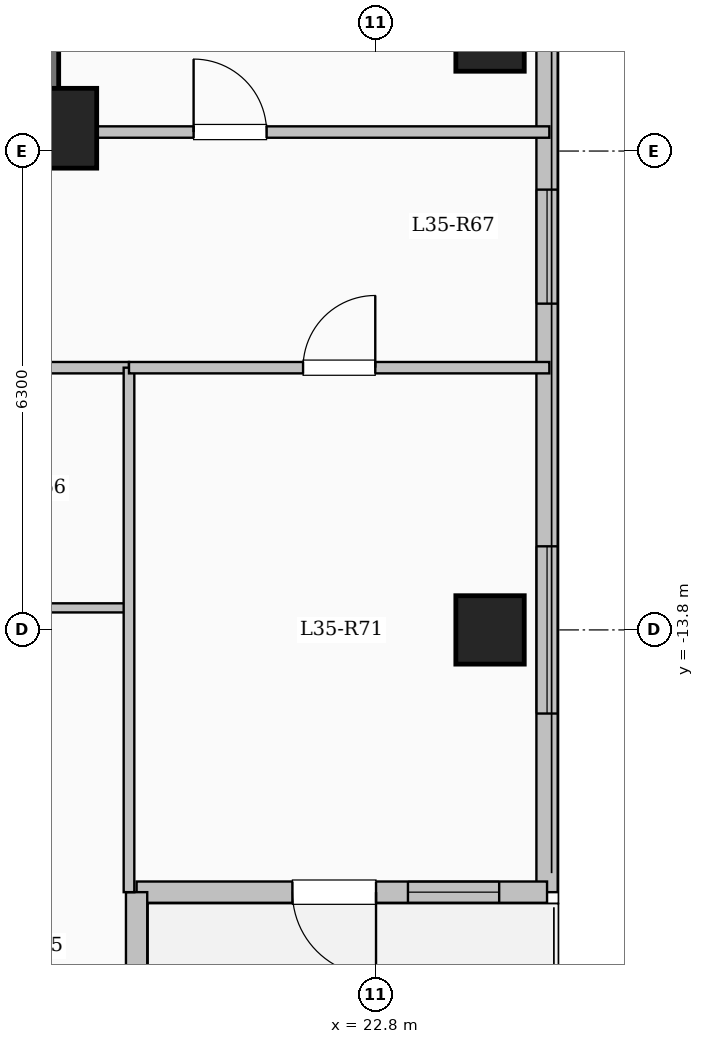
"""IFC4 building model, lengths in metres.
Left out: names, types, materials, properties, quantities, classifications, styles, units other than length and angle.
Written with IfcOpenShell. Run it as: python <this file> out.ifc"""

import sys

from ifc_helpers import new_model, si_unit, direction, frame, frame_2d, origin, origin_2d, place, context, subcontext, project, spatial, rectangle, extrude, element, fill, save


model = new_model("IFC4")
c1 = context("Model", 3, precision=1e-05, world=origin(), true_north=direction((0.0, 1.0)))
c2 = subcontext(c1, "Body", "Model", "MODEL_VIEW")
j1 = project(units=[si_unit("LENGTHUNIT", "METRE"), si_unit("PLANEANGLEUNIT", "RADIAN")], contexts=[c1])
p1 = place(None, origin())
s1 = spatial("IfcSite", under=j1, at=p1, CompositionType="ELEMENT")
p2 = place(p1, origin())
s2 = spatial("IfcBuilding", under=s1, at=p2, CompositionType="ELEMENT")
p3 = place(p2, frame((0.0, 0.0, 132.6)))
s3 = spatial("IfcBuildingStorey", under=s2, at=p3, CompositionType="ELEMENT", Elevation=132.6)
p4 = place(p3, frame((18.6, -7.2, 0.0), z_axis=(0.0, 0.0, 1.0), x_axis=(1.0, 0.0, 0.0)))
e1 = element("IfcColumn", 1, at=p4, inside=s3, PredefinedType="COLUMN", context=c2, shape_type="SweptSolid", body=[
    extrude(rectangle(XDim=1.05, YDim=1.05, at=origin_2d()), origin(), (0.0, 0.0, 1.0), 3.35),
])
for number, where, z_axis, x_axis in (
    (2, (24.3, -13.8, 0.0), (0.0, 0.0, 1.0), (1.0, 0.0, 0.0)),
    (3, (24.3, -6.0, 0.0), (0.0, 0.0, 1.0), (1.0, 0.0, 0.0)),
):
    element("IfcColumn", number, at=place(p3, frame(where, z_axis=z_axis, x_axis=x_axis)), inside=s3, PredefinedType="COLUMN", context=c2, shape_type="SweptSolid", body=[
        extrude(rectangle(XDim=0.9, YDim=0.9, at=origin_2d()), origin(), (0.0, 0.0, 1.0), 3.35),
    ])
p5 = place(p3, frame((25.05, 17.25, 0.0), z_axis=(0.0, 0.0, 1.0), x_axis=(0.0, -1.0, 0.0)))
e4 = element("IfcWall", 4, at=p5, inside=s3, PredefinedType="SOLIDWALL", context=c2, shape_type="SweptSolid", body=[
    extrude(rectangle(XDim=34.5, YDim=0.28, at=frame_2d((17.25, 0.0))), origin(), (0.0, 0.0, 1.0), 3.1),
])
p6 = place(p5, frame((1.375, 0.0, 0.9)))
e5 = element("IfcOpeningElement", 5, at=p6, cuts=e4, PredefinedType="OPENING", context=c2, shape_type="SweptSolid", body=[
    extrude(rectangle(XDim=2.0, YDim=1.7, at=frame_2d((1.0, 0.85))), frame((0.0, 0.15, 0.0), z_axis=(0.0, -1.0, 0.0), x_axis=(1.0, 0.0, 0.0)), (0.0, 0.0, 1.0), 0.3),
])
p7 = place(p5, frame((5.125, 0.0, 0.95)))
e6 = element("IfcOpeningElement", 6, at=p7, cuts=e4, PredefinedType="OPENING", context=c2, shape_type="SweptSolid", body=[
    extrude(rectangle(XDim=1.0, YDim=1.5, at=frame_2d((0.5, 0.75))), frame((0.0, 0.15, 0.0), z_axis=(0.0, -1.0, 0.0), x_axis=(1.0, 0.0, 0.0)), (0.0, 0.0, 1.0), 0.3),
])
p8 = place(p5, frame((8.375, 0.0, 0.9)))
e7 = element("IfcOpeningElement", 7, at=p8, cuts=e4, PredefinedType="OPENING", context=c2, shape_type="SweptSolid", body=[
    extrude(rectangle(XDim=2.0, YDim=1.7, at=frame_2d((1.0, 0.85))), frame((0.0, 0.15, 0.0), z_axis=(0.0, -1.0, 0.0), x_axis=(1.0, 0.0, 0.0)), (0.0, 0.0, 1.0), 0.3),
])
p9 = place(p5, frame((13.2, 0.0, 0.9)))
e8 = element("IfcOpeningElement", 8, at=p9, cuts=e4, PredefinedType="OPENING", context=c2, shape_type="SweptSolid", body=[
    extrude(rectangle(XDim=1.65, YDim=1.6, at=frame_2d((0.825, 0.8))), frame((0.0, 0.15, 0.0), z_axis=(0.0, -1.0, 0.0), x_axis=(1.0, 0.0, 0.0)), (0.0, 0.0, 1.0), 0.3),
])
p10 = place(p5, frame((19.05, 0.0, 0.9)))
e9 = element("IfcOpeningElement", 9, at=p10, cuts=e4, PredefinedType="OPENING", context=c2, shape_type="SweptSolid", body=[
    extrude(rectangle(XDim=2.2, YDim=1.75, at=frame_2d((1.1, 0.875))), frame((0.0, 0.15, 0.0), z_axis=(0.0, -1.0, 0.0), x_axis=(1.0, 0.0, 0.0)), (0.0, 0.0, 1.0), 0.3),
])
p11 = place(p5, frame((25.258, 0.0, 0.9)))
e10 = element("IfcOpeningElement", 10, at=p11, cuts=e4, PredefinedType="OPENING", context=c2, shape_type="SweptSolid", body=[
    extrude(rectangle(XDim=1.5, YDim=1.65, at=frame_2d((0.75, 0.825))), frame((0.0, 0.15, 0.0), z_axis=(0.0, -1.0, 0.0), x_axis=(1.0, 0.0, 0.0)), (0.0, 0.0, 1.0), 0.3),
])
p12 = place(p5, frame((29.95, 0.0, 0.9)))
e11 = element("IfcOpeningElement", 11, at=p12, cuts=e4, PredefinedType="OPENING", context=c2, shape_type="SweptSolid", body=[
    extrude(rectangle(XDim=2.2, YDim=1.75, at=frame_2d((1.1, 0.875))), frame((0.0, 0.15, 0.0), z_axis=(0.0, -1.0, 0.0), x_axis=(1.0, 0.0, 0.0)), (0.0, 0.0, 1.0), 0.3),
])
p13 = place(p3, frame((25.05, -17.25, 0.0), z_axis=(0.0, 0.0, 1.0), x_axis=(-1.0, 0.0, 0.0)))
e12 = element("IfcWall", 12, at=p13, inside=s3, PredefinedType="SOLIDWALL", context=c2, shape_type="SweptSolid", body=[
    extrude(rectangle(XDim=5.4, YDim=0.28, at=frame_2d((2.7, 0.0))), origin(), (0.0, 0.0, 1.0), 3.1),
])
p14 = place(p13, frame((2.25, 0.0, 0.0)))
e13 = element("IfcOpeningElement", 13, at=p14, cuts=e12, PredefinedType="OPENING", context=c2, shape_type="SweptSolid", body=[
    extrude(rectangle(XDim=1.1, YDim=2.2, at=frame_2d((0.55, 1.1))), frame((0.0, 0.15, 0.0), z_axis=(0.0, -1.0, 0.0), x_axis=(1.0, 0.0, 0.0)), (0.0, 0.0, 1.0), 0.3),
])
p15 = place(p13, frame((0.63, 0.0, 0.95)))
e14 = element("IfcOpeningElement", 14, at=p15, cuts=e12, PredefinedType="OPENING", context=c2, shape_type="SweptSolid", body=[
    extrude(rectangle(XDim=1.2, YDim=1.5, at=frame_2d((0.6, 0.75))), frame((0.0, 0.15, 0.0), z_axis=(0.0, -1.0, 0.0), x_axis=(1.0, 0.0, 0.0)), (0.0, 0.0, 1.0), 0.3),
])
p16 = place(p3, frame((19.65, -17.25, 0.0), z_axis=(0.0, 0.0, 1.0), x_axis=(0.0, -1.0, 0.0)))
e15 = element("IfcWall", 15, at=p16, inside=s3, PredefinedType="SOLIDWALL", context=c2, shape_type="SweptSolid", body=[
    extrude(rectangle(XDim=3.9, YDim=0.28, at=frame_2d((1.95, 0.0))), origin(), (0.0, 0.0, 1.0), 3.1),
])
p17 = place(p16, frame((1.107, 0.0, 0.9)))
e16 = element("IfcOpeningElement", 16, at=p17, cuts=e15, PredefinedType="OPENING", context=c2, shape_type="SweptSolid", body=[
    extrude(rectangle(XDim=1.65, YDim=1.6, at=frame_2d((0.825, 0.8))), frame((0.0, 0.15, 0.0), z_axis=(0.0, -1.0, 0.0), x_axis=(1.0, 0.0, 0.0)), (0.0, 0.0, 1.0), 0.3),
])
p18 = place(p3, frame((18.45, -7.375, 0.0), z_axis=(0.0, 0.0, 1.0), x_axis=(0.0, 1.0, 0.0)))
e17 = element("IfcWall", 17, at=p18, inside=s3, PredefinedType="SHEAR", context=c2, shape_type="SweptSolid", body=[
    extrude(rectangle(XDim=14.05, YDim=0.35, at=frame_2d((7.025, 0.0))), origin(), (0.0, 0.0, 1.0), 3.35),
])
p19 = place(p3, frame((10.075, -7.2, 0.0), z_axis=(0.0, 0.0, 1.0), x_axis=(1.0, 0.0, 0.0)))
e18 = element("IfcWall", 18, at=p19, inside=s3, PredefinedType="SHEAR", context=c2, shape_type="SweptSolid", body=[
    extrude(rectangle(XDim=8.55, YDim=0.35, at=frame_2d((4.275, 0.0))), origin(), (0.0, 0.0, 1.0), 3.35),
])
p20 = place(p3, frame((8.55, -10.35, 0.0), z_axis=(0.0, 0.0, 1.0), x_axis=(1.0, 0.0, 0.0)))
e19 = element("IfcWall", 19, at=p20, inside=s3, PredefinedType="PARTITIONING", context=c2, shape_type="SweptSolid", body=[
    extrude(rectangle(XDim=11.0, YDim=0.15, at=frame_2d((5.5, 0.0))), origin(), (0.0, 0.0, 1.0), 3.1),
])
p21 = place(p20, frame((0.75, 0.0, 0.0)))
e20 = element("IfcOpeningElement", 20, at=p21, cuts=e19, PredefinedType="OPENING", context=c2, shape_type="SweptSolid", body=[
    extrude(rectangle(XDim=0.96, YDim=2.15, at=frame_2d((0.48, 1.075))), frame((0.0, 0.085, 0.0), z_axis=(0.0, -1.0, 0.0), x_axis=(1.0, 0.0, 0.0)), (0.0, 0.0, 1.0), 0.17),
])
p22 = place(p20, frame((5.787, 0.0, 0.0)))
e21 = element("IfcOpeningElement", 21, at=p22, cuts=e19, PredefinedType="OPENING", context=c2, shape_type="SweptSolid", body=[
    extrude(rectangle(XDim=0.96, YDim=2.15, at=frame_2d((0.48, 1.075))), frame((0.0, 0.085, 0.0), z_axis=(0.0, -1.0, 0.0), x_axis=(1.0, 0.0, 0.0)), (0.0, 0.0, 1.0), 0.17),
])
p23 = place(p3, frame((16.649, -13.51, 0.0), z_axis=(0.0, 0.0, 1.0), x_axis=(1.0, 0.0, 0.0)))
e22 = element("IfcWall", 22, at=p23, inside=s3, PredefinedType="PARTITIONING", context=c2, shape_type="SweptSolid", body=[
    extrude(rectangle(XDim=2.961, YDim=0.12, at=frame_2d((1.48, 0.0))), origin(), (0.0, 0.0, 1.0), 3.1),
])
p24 = place(p3, frame((18.45, -7.25, 0.0), z_axis=(0.0, 0.0, 1.0), x_axis=(1.0, 0.0, 0.0)))
e23 = element("IfcWall", 23, at=p24, inside=s3, PredefinedType="PARTITIONING", context=c2, shape_type="SweptSolid", body=[
    extrude(rectangle(XDim=6.63, YDim=0.15, at=frame_2d((3.315, 0.0))), origin(), (0.0, 0.0, 1.0), 3.1),
])
p25 = place(p24, frame((1.95, 0.0, 0.0)))
e24 = element("IfcOpeningElement", 24, at=p25, cuts=e23, PredefinedType="OPENING", context=c2, shape_type="SweptSolid", body=[
    extrude(rectangle(XDim=0.96, YDim=2.15, at=frame_2d((0.48, 1.075))), frame((0.0, 0.085, 0.0), z_axis=(0.0, -1.0, 0.0), x_axis=(1.0, 0.0, 0.0)), (0.0, 0.0, 1.0), 0.17),
])
p26 = place(p3, frame((19.55, -17.25, 0.0), z_axis=(0.0, 0.0, 1.0), x_axis=(0.0, 1.0, 0.0)))
e25 = element("IfcWall", 25, at=p26, inside=s3, PredefinedType="PARTITIONING", context=c2, shape_type="SweptSolid", body=[
    extrude(rectangle(XDim=6.9, YDim=0.14, at=frame_2d((3.45, 0.0))), origin(), (0.0, 0.0, 1.0), 3.1),
])
p27 = place(p3, frame((19.55, -10.35, 0.0), z_axis=(0.0, 0.0, 1.0), x_axis=(1.0, 0.0, 0.0)))
e26 = element("IfcWall", 26, at=p27, inside=s3, PredefinedType="PARTITIONING", context=c2, shape_type="SweptSolid", body=[
    extrude(rectangle(XDim=5.53, YDim=0.15, at=frame_2d((2.765, 0.0))), origin(), (0.0, 0.0, 1.0), 3.1),
])
p28 = place(p27, frame((2.29, 0.0, 0.0)))
e27 = element("IfcOpeningElement", 27, at=p28, cuts=e26, PredefinedType="OPENING", context=c2, shape_type="SweptSolid", body=[
    extrude(rectangle(XDim=0.95, YDim=2.15, at=frame_2d((0.475, 1.075))), frame((0.0, 0.085, 0.0), z_axis=(0.0, -1.0, 0.0), x_axis=(1.0, 0.0, 0.0)), (0.0, 0.0, 1.0), 0.17),
])
p29 = place(p11, origin())
e28 = element("IfcWindow", 28, at=p29, inside=s3, PartitioningType="SINGLE_PANEL", PredefinedType="WINDOW", context=c2, shape_type="SweptSolid", body=[
    extrude(rectangle(XDim=1.5, YDim=1.65, at=frame_2d((0.75, 0.825))), frame((0.0, 0.03, 0.0), z_axis=(0.0, -1.0, 0.0), x_axis=(1.0, 0.0, 0.0)), (0.0, 0.0, 1.0), 0.06),
])
fill(e10, e28)
p30 = place(p12, origin())
e29 = element("IfcWindow", 29, at=p30, inside=s3, PartitioningType="SINGLE_PANEL", PredefinedType="WINDOW", context=c2, shape_type="SweptSolid", body=[
    extrude(rectangle(XDim=2.2, YDim=1.75, at=frame_2d((1.1, 0.875))), frame((0.0, 0.03, 0.0), z_axis=(0.0, -1.0, 0.0), x_axis=(1.0, 0.0, 0.0)), (0.0, 0.0, 1.0), 0.06),
])
fill(e11, e29)
p31 = place(p14, origin())
e30 = element("IfcDoor", 30, at=p31, inside=s3, OperationType="SINGLE_SWING_LEFT", PredefinedType="DOOR", context=c2, shape_type="SweptSolid", body=[
    extrude(rectangle(XDim=1.1, YDim=2.2, at=frame_2d((0.55, 1.1))), frame((0.0, 0.025, 0.0), z_axis=(0.0, -1.0, 0.0), x_axis=(1.0, 0.0, 0.0)), (0.0, 0.0, 1.0), 0.05),
])
fill(e13, e30)
p32 = place(p15, origin())
e31 = element("IfcWindow", 31, at=p32, inside=s3, PartitioningType="SINGLE_PANEL", PredefinedType="WINDOW", context=c2, shape_type="SweptSolid", body=[
    extrude(rectangle(XDim=1.2, YDim=1.5, at=frame_2d((0.6, 0.75))), frame((0.0, 0.03, 0.0), z_axis=(0.0, -1.0, 0.0), x_axis=(1.0, 0.0, 0.0)), (0.0, 0.0, 1.0), 0.06),
])
fill(e14, e31)
p33 = place(p28, origin())
e32 = element("IfcDoor", 32, at=p33, inside=s3, OperationType="SINGLE_SWING_RIGHT", PredefinedType="DOOR", context=c2, shape_type="SweptSolid", body=[
    extrude(rectangle(XDim=0.95, YDim=2.15, at=frame_2d((0.475, 1.075))), frame((0.0, 0.025, 0.0), z_axis=(0.0, -1.0, 0.0), x_axis=(1.0, 0.0, 0.0)), (0.0, 0.0, 1.0), 0.05),
])
fill(e27, e32)
p34 = place(p25, origin())
e33 = element("IfcDoor", 33, at=p34, inside=s3, OperationType="SINGLE_SWING_LEFT", PredefinedType="DOOR", context=c2, shape_type="SweptSolid", body=[
    extrude(rectangle(XDim=0.96, YDim=2.15, at=frame_2d((0.48, 1.075))), frame((0.0, 0.025, 0.0), z_axis=(0.0, -1.0, 0.0), x_axis=(1.0, 0.0, 0.0)), (0.0, 0.0, 1.0), 0.05),
])
fill(e24, e33)
save(model, sys.argv[1])
